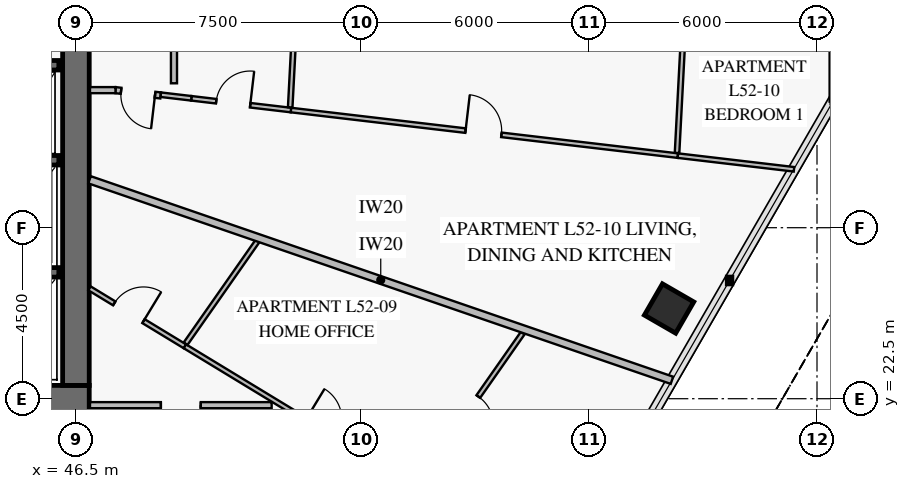
"""IFC4 building model, lengths in metres.
Left out: names, types, materials, properties, quantities, classifications, styles, units other than length and angle.
Written with IfcOpenShell. Run it as: python <this file> out.ifc"""

import sys

from ifc_helpers import new_model, si_unit, direction, frame, frame_2d, origin, origin_2d, place, context, subcontext, project, spatial, rectangle, extrude, element, fill, save


model = new_model("IFC4")
c1 = context("Model", 3, precision=1e-05, world=origin(), true_north=direction((0.0, 1.0)))
c2 = subcontext(c1, "Body", "Model", "MODEL_VIEW")
j1 = project(units=[si_unit("LENGTHUNIT", "METRE"), si_unit("PLANEANGLEUNIT", "RADIAN")], contexts=[c1])
p1 = place(None, origin())
s1 = spatial("IfcSite", under=j1, at=p1, CompositionType="ELEMENT")
p2 = place(p1, origin())
s2 = spatial("IfcBuilding", under=s1, at=p2, CompositionType="ELEMENT")
p3 = place(p2, frame((0.0, 0.0, 207.4)))
s3 = spatial("IfcBuildingStorey", under=s2, at=p3, CompositionType="ELEMENT", Elevation=207.4)
p4 = place(p3, frame((37.35, 22.5, 0.0), z_axis=(0.0, 0.0, 1.0), x_axis=(1.0, 0.0, 0.0)))
e1 = element("IfcWall", 1, at=p4, inside=s3, PredefinedType="SHEAR", context=c2, shape_type="SweptSolid", body=[
    extrude(rectangle(XDim=9.5, YDim=0.7, at=frame_2d((4.75, 0.0))), origin(), (0.0, 0.0, 1.0), 3.8),
])
p5 = place(p4, frame((3.95, 0.0, 0.0)))
e2 = element("IfcOpeningElement", 2, at=p5, cuts=e1, PredefinedType="OPENING", context=c2, shape_type="SweptSolid", body=[
    extrude(rectangle(XDim=1.5, YDim=2.15, at=frame_2d((0.75, 1.075))), frame((0.0, 0.362, 0.0), z_axis=(0.0, -1.0, 0.0), x_axis=(1.0, 0.0, 0.0)), (0.0, 0.0, 1.0), 0.724),
])
p6 = place(p3, frame((46.5, 22.85, 0.0), z_axis=(0.0, 0.0, 1.0), x_axis=(0.0, 1.0, 0.0)))
e3 = element("IfcWall", 3, at=p6, inside=s3, PredefinedType="SHEAR", context=c2, shape_type="SweptSolid", body=[
    extrude(rectangle(XDim=18.3, YDim=0.7, at=frame_2d((9.15, 0.0))), origin(), (0.0, 0.0, 1.0), 3.8),
])
p7 = place(p6, frame((8.9, 0.0, 0.0)))
e4 = element("IfcOpeningElement", 4, at=p7, cuts=e3, PredefinedType="OPENING", context=c2, shape_type="SweptSolid", body=[
    extrude(rectangle(XDim=1.1, YDim=2.15, at=frame_2d((0.55, 1.075))), frame((0.0, 0.362, 0.0), z_axis=(0.0, -1.0, 0.0), x_axis=(1.0, 0.0, 0.0)), (0.0, 0.0, 1.0), 0.724),
])
p8 = place(p3, frame((62.108, 24.874, 0.0), z_axis=(0.0, 0.0, 1.0), x_axis=(0.5, 0.866025403784, 0.0)))
e5 = element("IfcColumn", 5, at=p8, inside=s3, PredefinedType="COLUMN", context=c2, shape_type="SweptSolid", body=[
    extrude(rectangle(XDim=0.95, YDim=0.95, at=origin_2d()), origin(), (0.0, 0.0, 1.0), 3.55),
])
p9 = place(p3, frame((66.472, 33.683, 0.0), z_axis=(0.0, 0.0, 1.0), x_axis=(0.0, -1.0, 0.0)))
e6 = element("IfcWall", 6, at=p9, inside=s3, PredefinedType="SOLIDWALL", context=c2, shape_type="SweptSolid", body=[
    extrude(rectangle(XDim=3.365, YDim=0.28, at=frame_2d((1.683, 0.0))), origin(), (0.0, 0.0, 1.0), 3.55),
])
p10 = place(p9, frame((0.179, 0.0, 0.85)))
e7 = element("IfcOpeningElement", 7, at=p10, cuts=e6, PredefinedType="OPENING", context=c2, shape_type="SweptSolid", body=[
    extrude(rectangle(XDim=0.75, YDim=1.5, at=frame_2d((0.375, 0.75))), frame((0.0, 0.152, 0.0), z_axis=(0.0, -1.0, 0.0), x_axis=(1.0, 0.0, 0.0)), (0.0, 0.0, 1.0), 0.304),
])
p11 = place(p3, frame((25.95, 31.275, 0.0), z_axis=(0.0, 0.0, 1.0), x_axis=(1.0, 0.0, 0.0)))
e8 = element("IfcWall", 8, at=p11, inside=s3, PredefinedType="SOLIDWALL", context=c2, shape_type="SweptSolid", body=[
    extrude(rectangle(XDim=20.1, YDim=0.25, at=frame_2d((10.05, 0.0))), origin(), (0.0, 0.0, 1.0), 3.8),
])
p12 = place(p11, frame((2.6, 0.0, 0.0)))
e9 = element("IfcOpeningElement", 9, at=p12, cuts=e8, PredefinedType="OPENING", context=c2, shape_type="SweptSolid", body=[
    extrude(rectangle(XDim=1.1, YDim=2.15, at=frame_2d((0.55, 1.075))), frame((0.0, 0.137, 0.0), z_axis=(0.0, -1.0, 0.0), x_axis=(1.0, 0.0, 0.0)), (0.0, 0.0, 1.0), 0.274),
])
p13 = place(p11, frame((10.6, 0.0, 0.0)))
e10 = element("IfcOpeningElement", 10, at=p13, cuts=e8, PredefinedType="OPENING", context=c2, shape_type="SweptSolid", body=[
    extrude(rectangle(XDim=1.1, YDim=2.15, at=frame_2d((0.55, 1.075))), frame((0.0, 0.137, 0.0), z_axis=(0.0, -1.0, 0.0), x_axis=(1.0, 0.0, 0.0)), (0.0, 0.0, 1.0), 0.274),
])
p14 = place(p11, frame((16.35, 0.0, 0.0)))
e11 = element("IfcOpeningElement", 11, at=p14, cuts=e8, PredefinedType="OPENING", context=c2, shape_type="SweptSolid", body=[
    extrude(rectangle(XDim=1.1, YDim=2.15, at=frame_2d((0.55, 1.075))), frame((0.0, 0.137, 0.0), z_axis=(0.0, -1.0, 0.0), x_axis=(1.0, 0.0, 0.0)), (0.0, 0.0, 1.0), 0.274),
])
for number, where, z_axis, x_axis in (
    (12, (43.8, 25.825, 0.0), (0.0, 0.0, 1.0), (1.0, 0.0, 0.0)),
    (13, (43.8, 28.775, 0.0), (0.0, 0.0, 1.0), (1.0, 0.0, 0.0)),
):
    element("IfcWall", number, at=place(p3, frame(where, z_axis=z_axis, x_axis=x_axis)), inside=s3, PredefinedType="SOLIDWALL", context=c2, shape_type="SweptSolid", body=[
        extrude(rectangle(XDim=2.25, YDim=0.25, at=frame_2d((1.125, 0.0))), origin(), (0.0, 0.0, 1.0), 3.8),
    ])
p15 = place(p3, frame((46.858, 25.404, 0.0), z_axis=(0.0, 0.0, 1.0), x_axis=(0.85464129029, -0.519218898857, 0.0)))
e14 = element("IfcWall", 14, at=p15, inside=s3, PredefinedType="PARTITIONING", context=c2, shape_type="SweptSolid", body=[
    extrude(rectangle(XDim=2.937, YDim=0.12, at=frame_2d((1.469, 0.0))), origin(), (0.0, 0.0, 1.0), 3.55),
])
p16 = place(p15, frame((0.761, 0.0, 0.0)))
e15 = element("IfcOpeningElement", 15, at=p16, cuts=e14, PredefinedType="OPENING", context=c2, shape_type="SweptSolid", body=[
    extrude(rectangle(XDim=0.9, YDim=2.1, at=frame_2d((0.45, 1.05))), frame((0.0, 0.072, 0.0), z_axis=(0.0, -1.0, 0.0), x_axis=(1.0, 0.0, 0.0)), (0.0, 0.0, 1.0), 0.144),
])
p17 = place(p3, frame((49.368, 23.879, 0.0), z_axis=(0.0, 0.0, 1.0), x_axis=(0.854630517303, -0.519236630925, 0.0)))
e16 = element("IfcWall", 16, at=p17, inside=s3, PredefinedType="PARTITIONING", context=c2, shape_type="SweptSolid", body=[
    extrude(rectangle(XDim=7.122, YDim=0.12, at=frame_2d((3.561, 0.0))), origin(), (0.0, 0.0, 1.0), 3.15),
])
p18 = place(p17, frame((3.721, 0.0, 0.0)))
e17 = element("IfcOpeningElement", 17, at=p18, cuts=e16, PredefinedType="OPENING", context=c2, shape_type="SweptSolid", body=[
    extrude(rectangle(XDim=0.95, YDim=2.1, at=frame_2d((0.475, 1.05))), frame((0.0, 0.072, 0.0), z_axis=(0.0, -1.0, 0.0), x_axis=(1.0, 0.0, 0.0)), (0.0, 0.0, 1.0), 0.144),
])
p19 = place(p3, frame((55.472, 20.25, 0.0), z_axis=(0.0, 0.0, 1.0), x_axis=(0.573594011526, 0.819139737738, 0.0)))
e18 = element("IfcWall", 18, at=p19, inside=s3, PredefinedType="PARTITIONING", context=c2, shape_type="SweptSolid", body=[
    extrude(rectangle(XDim=4.853, YDim=0.12, at=frame_2d((2.427, 0.0))), origin(), (0.0, 0.0, 1.0), 3.55),
])
p20 = place(p19, frame((1.867, 0.0, 0.0)))
e19 = element("IfcOpeningElement", 19, at=p20, cuts=e18, PredefinedType="OPENING", context=c2, shape_type="SweptSolid", body=[
    extrude(rectangle(XDim=0.95, YDim=2.1, at=frame_2d((0.475, 1.05))), frame((0.0, 0.072, 0.0), z_axis=(0.0, -1.0, 0.0), x_axis=(1.0, 0.0, 0.0)), (0.0, 0.0, 1.0), 0.144),
])
p21 = place(p3, frame((51.65, 22.33, 0.0), z_axis=(0.0, 0.0, 1.0), x_axis=(-1.0, 0.0, 0.0)))
e20 = element("IfcWall", 20, at=p21, inside=s3, PredefinedType="PARTITIONING", context=c2, shape_type="SweptSolid", body=[
    extrude(rectangle(XDim=4.78, YDim=0.16, at=frame_2d((2.39, 0.0))), origin(), (0.0, 0.0, 1.0), 3.55),
])
p22 = place(p21, frame((1.865, 0.0, 0.0)))
e21 = element("IfcOpeningElement", 21, at=p22, cuts=e20, PredefinedType="OPENING", context=c2, shape_type="SweptSolid", body=[
    extrude(rectangle(XDim=1.05, YDim=2.15, at=frame_2d((0.525, 1.075))), frame((0.0, 0.092, 0.0), z_axis=(0.0, -1.0, 0.0), x_axis=(1.0, 0.0, 0.0)), (0.0, 0.0, 1.0), 0.184),
])
p23 = place(p3, frame((49.537, 30.405, 0.0), z_axis=(0.0, 0.0, 1.0), x_axis=(0.993127868893, -0.117034336965, 0.0)))
e22 = element("IfcWall", 22, at=p23, inside=s3, PredefinedType="PARTITIONING", context=c2, shape_type="SweptSolid", body=[
    extrude(rectangle(XDim=2.641, YDim=0.12, at=frame_2d((1.32, 0.0))), origin(), (0.0, 0.0, 1.0), 3.55),
])
p24 = place(p23, frame((0.659, 0.0, 0.0)))
e23 = element("IfcOpeningElement", 23, at=p24, cuts=e22, PredefinedType="OPENING", context=c2, shape_type="SweptSolid", body=[
    extrude(rectangle(XDim=0.9, YDim=2.1, at=frame_2d((0.45, 1.05))), frame((0.0, 0.072, 0.0), z_axis=(0.0, -1.0, 0.0), x_axis=(1.0, 0.0, 0.0)), (0.0, 0.0, 1.0), 0.144),
])
p25 = place(p3, frame((52.159, 30.096, 0.0), z_axis=(0.0, 0.0, 1.0), x_axis=(0.993128962812, -0.117025053828, 0.0)))
e24 = element("IfcWall", 24, at=p25, inside=s3, PredefinedType="PARTITIONING", context=c2, shape_type="SweptSolid", body=[
    extrude(rectangle(XDim=10.25, YDim=0.12, at=frame_2d((5.125, 0.0))), origin(), (0.0, 0.0, 1.0), 2.87),
])
p26 = place(p25, frame((4.625, 0.0, 0.0)))
e25 = element("IfcOpeningElement", 25, at=p26, cuts=e24, PredefinedType="OPENING", context=c2, shape_type="SweptSolid", body=[
    extrude(rectangle(XDim=0.95, YDim=2.1, at=frame_2d((0.475, 1.05))), frame((0.0, 0.072, 0.0), z_axis=(0.0, -1.0, 0.0), x_axis=(1.0, 0.0, 0.0)), (0.0, 0.0, 1.0), 0.144),
])
p27 = place(p3, frame((62.317, 28.968, 0.0), z_axis=(0.0, 0.0, 1.0), x_axis=(0.052336032443, 0.998629530761, 0.0)))
e26 = element("IfcWall", 26, at=p27, inside=s3, PredefinedType="PARTITIONING", context=c2, shape_type="SweptSolid", body=[
    extrude(rectangle(XDim=9.087, YDim=0.12, at=frame_2d((4.543, 0.0))), origin(), (0.0, 0.0, 1.0), 2.87),
])
p28 = place(p27, frame((3.984, 0.0, 0.0)))
e27 = element("IfcOpeningElement", 27, at=p28, cuts=e26, PredefinedType="OPENING", context=c2, shape_type="SweptSolid", body=[
    extrude(rectangle(XDim=0.95, YDim=2.1, at=frame_2d((0.475, 1.05))), frame((0.0, 0.072, 0.0), z_axis=(0.0, -1.0, 0.0), x_axis=(1.0, 0.0, 0.0)), (0.0, 0.0, 1.0), 0.144),
])
p29 = place(p3, frame((47.541, 30.62, 0.0), z_axis=(0.0, 0.0, 1.0), x_axis=(0.993117135496, -0.117125382325, 0.0)))
e28 = element("IfcWall", 28, at=p29, inside=s3, PredefinedType="PARTITIONING", context=c2, shape_type="SweptSolid", body=[
    extrude(rectangle(XDim=1.197, YDim=0.16, at=frame_2d((0.598, 0.0))), origin(), (0.0, 0.0, 1.0), 3.55),
])
p30 = place(p29, frame((0.148, 0.0, 0.0)))
e29 = element("IfcOpeningElement", 29, at=p30, cuts=e28, PredefinedType="OPENING", context=c2, shape_type="SweptSolid", body=[
    extrude(rectangle(XDim=0.9, YDim=2.1, at=frame_2d((0.45, 1.05))), frame((0.0, 0.092, 0.0), z_axis=(0.0, -1.0, 0.0), x_axis=(1.0, 0.0, 0.0)), (0.0, 0.0, 1.0), 0.184),
])
p31 = place(p3, frame((49.385, 23.948, 0.0), z_axis=(0.0, 0.0, 1.0), x_axis=(0.573609327382, 0.819129012757, 0.0)))
e30 = element("IfcWall", 30, at=p31, inside=s3, PredefinedType="PARTITIONING", context=c2, shape_type="SweptSolid", body=[
    extrude(rectangle(XDim=3.344, YDim=0.12, at=frame_2d((1.672, 0.0))), origin(), (0.0, 0.0, 1.0), 3.55),
])
p32 = place(p3, frame((46.858, 28.261, 0.0), z_axis=(0.0, 0.0, 1.0), x_axis=(0.945519192018, -0.325566364243, 0.0)))
e31 = element("IfcWall", 31, at=p32, inside=s3, PredefinedType="PARTITIONING", context=c2, shape_type="SweptSolid", body=[
    extrude(rectangle(XDim=16.208, YDim=0.2, at=frame_2d((8.104, 0.0))), origin(), (0.0, 0.0, 1.0), 2.87),
])
p33 = place(p3, frame((48.732, 30.5, 0.0), z_axis=(0.0, 0.0, 1.0), x_axis=(0.993146491389, -0.116876202202, 0.0)))
e32 = element("IfcWall", 32, at=p33, inside=s3, PredefinedType="PARTITIONING", context=c2, shape_type="SweptSolid", body=[
    extrude(rectangle(XDim=0.811, YDim=0.12, at=frame_2d((0.405, 0.0))), origin(), (0.0, 0.0, 1.0), 3.55),
])
p34 = place(p3, frame((62.339, 28.896, 0.0), z_axis=(0.0, 0.0, 1.0), x_axis=(0.99313759999, -0.116951731436, 0.0)))
e33 = element("IfcWall", 33, at=p34, inside=s3, PredefinedType="PARTITIONING", context=c2, shape_type="SweptSolid", body=[
    extrude(rectangle(XDim=3.077, YDim=0.12, at=frame_2d((1.539, 0.0))), origin(), (0.0, 0.0, 1.0), 3.55),
])
p35 = place(p3, frame((52.138, 30.167, 0.0), z_axis=(0.0, 0.0, 1.0), x_axis=(0.052317957022, 0.998630477891, 0.0)))
e34 = element("IfcWall", 34, at=p35, inside=s3, PredefinedType="PARTITIONING", context=c2, shape_type="SweptSolid", body=[
    extrude(rectangle(XDim=5.586, YDim=0.12, at=frame_2d((2.793, 0.0))), origin(), (0.0, 0.0, 1.0), 3.55),
])
p36 = place(p3, frame((46.87, 30.62, 0.0), z_axis=(0.0, 0.0, 1.0), x_axis=(1.0, 0.0, 0.0)))
e35 = element("IfcWall", 35, at=p36, inside=s3, PredefinedType="PARTITIONING", context=c2, shape_type="SweptSolid", body=[
    extrude(rectangle(XDim=0.671, YDim=0.16, at=frame_2d((0.335, 0.0))), origin(), (0.0, 0.0, 1.0), 3.55),
])
p37 = place(p3, frame((49.08, 30.8, 0.0), z_axis=(0.0, 0.0, 1.0), x_axis=(0.0, 1.0, 0.0)))
e36 = element("IfcWall", 36, at=p37, inside=s3, PredefinedType="PARTITIONING", context=c2, shape_type="SweptSolid", body=[
    extrude(rectangle(XDim=4.079, YDim=0.16, at=frame_2d((2.04, 0.0))), origin(), (0.0, 0.0, 1.0), 3.55),
])
p38 = place(p16, origin())
e37 = element("IfcDoor", 37, at=p38, inside=s3, OperationType="SINGLE_SWING_RIGHT", PredefinedType="DOOR", context=c2, shape_type="SweptSolid", body=[
    extrude(rectangle(XDim=0.9, YDim=2.1, at=frame_2d((0.45, 1.05))), frame((0.0, 0.025, 0.0), z_axis=(0.0, -1.0, 0.0), x_axis=(1.0, 0.0, 0.0)), (0.0, 0.0, 1.0), 0.05),
])
fill(e15, e37)
p39 = place(p20, frame((0.95, 0.0, 0.0), z_axis=(0.0, 0.0, 1.0), x_axis=(-1.0, 0.0, 0.0)))
e38 = element("IfcDoor", 38, at=p39, inside=s3, OperationType="SINGLE_SWING_RIGHT", PredefinedType="DOOR", context=c2, shape_type="SweptSolid", body=[
    extrude(rectangle(XDim=0.95, YDim=2.1, at=frame_2d((0.475, 1.05))), frame((0.0, 0.025, 0.0), z_axis=(0.0, -1.0, 0.0), x_axis=(1.0, 0.0, 0.0)), (0.0, 0.0, 1.0), 0.05),
])
fill(e19, e38)
p40 = place(p22, origin())
e39 = element("IfcDoor", 39, at=p40, inside=s3, OperationType="SINGLE_SWING_LEFT", PredefinedType="DOOR", context=c2, shape_type="SweptSolid", body=[
    extrude(rectangle(XDim=1.05, YDim=2.15, at=frame_2d((0.525, 1.075))), frame((0.0, 0.025, 0.0), z_axis=(0.0, -1.0, 0.0), x_axis=(1.0, 0.0, 0.0)), (0.0, 0.0, 1.0), 0.05),
])
fill(e21, e39)
p41 = place(p24, origin())
e40 = element("IfcDoor", 40, at=p41, inside=s3, OperationType="SINGLE_SWING_RIGHT", PredefinedType="DOOR", context=c2, shape_type="SweptSolid", body=[
    extrude(rectangle(XDim=0.9, YDim=2.1, at=frame_2d((0.45, 1.05))), frame((0.0, 0.025, 0.0), z_axis=(0.0, -1.0, 0.0), x_axis=(1.0, 0.0, 0.0)), (0.0, 0.0, 1.0), 0.05),
])
fill(e23, e40)
p42 = place(p26, origin())
e41 = element("IfcDoor", 41, at=p42, inside=s3, OperationType="SINGLE_SWING_LEFT", PredefinedType="DOOR", context=c2, shape_type="SweptSolid", body=[
    extrude(rectangle(XDim=0.95, YDim=2.1, at=frame_2d((0.475, 1.05))), frame((0.0, 0.025, 0.0), z_axis=(0.0, -1.0, 0.0), x_axis=(1.0, 0.0, 0.0)), (0.0, 0.0, 1.0), 0.05),
])
fill(e25, e41)
p43 = place(p30, frame((0.9, 0.0, 0.0), z_axis=(0.0, 0.0, 1.0), x_axis=(-1.0, 0.0, 0.0)))
e42 = element("IfcDoor", 42, at=p43, inside=s3, OperationType="SINGLE_SWING_LEFT", PredefinedType="DOOR", context=c2, shape_type="SweptSolid", body=[
    extrude(rectangle(XDim=0.9, YDim=2.1, at=frame_2d((0.45, 1.05))), frame((0.0, 0.025, 0.0), z_axis=(0.0, -1.0, 0.0), x_axis=(1.0, 0.0, 0.0)), (0.0, 0.0, 1.0), 0.05),
])
fill(e29, e42)
save(model, sys.argv[1])
